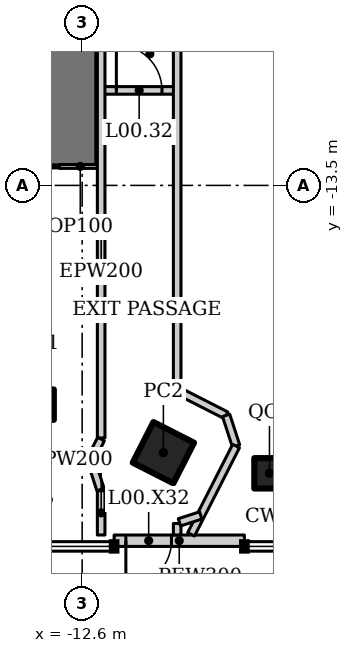
"""IFC4 building model, lengths in metres.
Left out: names, types, materials, properties, quantities, classifications, styles, units other than length and angle.
Written with IfcOpenShell. Run it as: python <this file> out.ifc"""

import sys

from ifc_helpers import new_model, si_unit, direction, frame, frame_2d, origin, origin_2d, place, context, subcontext, project, spatial, rectangle, hollow_rectangle, extrude, element, fill, save


model = new_model("IFC4")
c1 = context("Model", 3, precision=1e-05, world=origin(), true_north=direction((0.0, 1.0)))
c2 = subcontext(c1, "Body", "Model", "MODEL_VIEW")
j1 = project(units=[si_unit("LENGTHUNIT", "METRE"), si_unit("PLANEANGLEUNIT", "RADIAN")], contexts=[c1])
p1 = place(None, origin())
s1 = spatial("IfcSite", under=j1, at=p1, CompositionType="ELEMENT")
p2 = place(p1, origin())
s2 = spatial("IfcBuilding", under=s1, at=p2, CompositionType="ELEMENT")
p3 = place(p2, origin())
s3 = spatial("IfcBuildingStorey", under=s2, at=p3, CompositionType="ELEMENT", Elevation=0.0)
p4 = place(p3, frame((-10.463, -20.534, 0.0), z_axis=(0.0, 0.0, 1.0), x_axis=(0.45399049974, 0.891006524188, 0.0)))
e1 = element("IfcColumn", 1, at=p4, inside=s3, PredefinedType="COLUMN", context=c2, shape_type="SweptSolid", body=[
    extrude(hollow_rectangle(XDim=1.2, YDim=1.2, WallThickness=0.1, at=origin_2d()), origin(), (0.0, 0.0, 1.0), 6.5),
])
for number, where, z_axis, x_axis in (
    (2, (-13.745, -19.27, 0.0), (0.0, 0.0, 1.0), (1.0, 0.0, 0.0)),
    (3, (-7.671, -21.076, 0.0), (0.0, 0.0, 1.0), (1.0, 0.0, 0.0)),
):
    element("IfcColumn", number, at=place(p3, frame(where, z_axis=z_axis, x_axis=x_axis)), inside=s3, PredefinedType="COLUMN", context=c2, shape_type="SweptSolid", body=[
        extrude(hollow_rectangle(XDim=0.8, YDim=0.8, WallThickness=0.05, at=origin_2d()), origin(), (0.0, 0.0, 1.0), 6.5),
    ])
p5 = place(p3, frame((-13.2, 13.0, 0.0), z_axis=(0.0, 0.0, 1.0), x_axis=(0.0, -1.0, 0.0)))
e4 = element("IfcWall", 4, at=p5, inside=s3, PredefinedType="SHEAR", context=c2, shape_type="SweptSolid", body=[
    extrude(rectangle(XDim=26.0, YDim=2.0, at=frame_2d((13.0, 0.0))), origin(), (0.0, 0.0, 1.0), 6.5),
])
p6 = place(p5, frame((12.1, 0.0, 0.0)))
e5 = element("IfcOpeningElement", 5, at=p6, cuts=e4, PredefinedType="OPENING", context=c2, shape_type="SweptSolid", body=[
    extrude(rectangle(XDim=1.8, YDim=2.1, at=frame_2d((0.9, 1.05))), frame((0.0, 1.01, 0.0), z_axis=(0.0, -1.0, 0.0), x_axis=(1.0, 0.0, 0.0)), (0.0, 0.0, 1.0), 2.02),
])
p7 = place(p3, frame((-11.759, -22.85, 0.0), z_axis=(0.0, 0.0, 1.0), x_axis=(1.0, 0.0, 0.0)))
e6 = element("IfcWall", 6, at=p7, inside=s3, PredefinedType="SOLIDWALL", context=c2, shape_type="SweptSolid", body=[
    extrude(rectangle(XDim=3.428, YDim=0.3, at=frame_2d((1.714, 0.0))), origin(), (0.0, 0.0, 1.0), 6.3),
])
p8 = place(p7, frame((0.309, 0.0, 0.0)))
e7 = element("IfcOpeningElement", 7, at=p8, cuts=e6, PredefinedType="OPENING", context=c2, shape_type="SweptSolid", body=[
    extrude(rectangle(XDim=1.2, YDim=2.1, at=frame_2d((0.6, 1.05))), frame((0.0, 0.16, 0.0), z_axis=(0.0, -1.0, 0.0), x_axis=(1.0, 0.0, 0.0)), (0.0, 0.0, 1.0), 0.32),
])
p9 = place(p3, frame((-12.1, -11.0, 0.0), z_axis=(0.0, 0.0, 1.0), x_axis=(1.0, 0.0, 0.0)))
e8 = element("IfcWall", 8, at=p9, inside=s3, PredefinedType="SOLIDWALL", context=c2, shape_type="SweptSolid", body=[
    extrude(rectangle(XDim=2.0, YDim=0.2, at=frame_2d((1.0, 0.0))), origin(), (0.0, 0.0, 1.0), 6.3),
])
p10 = place(p9, frame((0.4, 0.0, 0.0)))
e9 = element("IfcOpeningElement", 9, at=p10, cuts=e8, PredefinedType="OPENING", context=c2, shape_type="SweptSolid", body=[
    extrude(rectangle(XDim=1.2, YDim=2.1, at=frame_2d((0.6, 1.05))), frame((0.0, 0.11, 0.0), z_axis=(0.0, -1.0, 0.0), x_axis=(1.0, 0.0, 0.0)), (0.0, 0.0, 1.0), 0.22),
])
p11 = place(p3, frame((-13.2, -13.0, 0.0), z_axis=(0.0, 0.0, 1.0), x_axis=(1.0, 0.0, 0.0)))
e10 = element("IfcWall", 10, at=p11, inside=s3, PredefinedType="PARTITIONING", context=c2, shape_type="SweptSolid", body=[
    extrude(rectangle(XDim=1.1, YDim=0.1, at=frame_2d((0.55, 0.0))), origin(), (0.0, 0.0, 1.0), 6.3),
])
p12 = place(p3, frame((-12.1, -9.2, 0.0), z_axis=(0.0, 0.0, 1.0), x_axis=(0.0, -1.0, 0.0)))
e11 = element("IfcWall", 11, at=p12, inside=s3, PredefinedType="SOLIDWALL", context=c2, shape_type="SweptSolid", body=[
    extrude(rectangle(XDim=10.946, YDim=0.2, at=frame_2d((5.473, 0.0))), origin(), (0.0, 0.0, 1.0), 6.3),
])
p13 = place(p3, frame((-12.1, -21.535, 0.0), z_axis=(0.0, 0.0, 1.0), x_axis=(0.0, -1.0, 0.0)))
e12 = element("IfcWall", 12, at=p13, inside=s3, PredefinedType="SOLIDWALL", context=c2, shape_type="SweptSolid", body=[
    extrude(rectangle(XDim=1.165, YDim=0.2, at=frame_2d((0.583, 0.0))), origin(), (0.0, 0.0, 1.0), 6.3),
])
p14 = place(p3, frame((-10.1, -22.7, 0.0), z_axis=(0.0, 0.0, 1.0), x_axis=(0.0, 1.0, 0.0)))
e13 = element("IfcWall", 13, at=p14, inside=s3, PredefinedType="SOLIDWALL", context=c2, shape_type="SweptSolid", body=[
    extrude(rectangle(XDim=0.303, YDim=0.2, at=frame_2d((0.152, 0.0))), origin(), (0.0, 0.0, 1.0), 6.3),
])
p15 = place(p3, frame((-10.1, -18.884, 0.0), z_axis=(0.0, 0.0, 1.0), x_axis=(0.0, 1.0, 0.0)))
e14 = element("IfcWall", 14, at=p15, inside=s3, PredefinedType="SOLIDWALL", context=c2, shape_type="SweptSolid", body=[
    extrude(rectangle(XDim=9.684, YDim=0.2, at=frame_2d((4.842, 0.0))), origin(), (0.0, 0.0, 1.0), 6.3),
])
p16 = place(p3, frame((-12.117, -21.505, 0.0), z_axis=(0.0, 0.0, 1.0), x_axis=(-0.308775894508, 0.951134820607, 0.0)))
e15 = element("IfcWall", 15, at=p16, inside=s3, PredefinedType="SOLIDWALL", context=c2, shape_type="SweptSolid", body=[
    extrude(rectangle(XDim=0.836, YDim=0.2, at=frame_2d((0.418, 0.0))), origin(), (0.0, 0.0, 1.0), 6.3),
])
p17 = place(p3, frame((-12.375, -20.709, 0.0), z_axis=(0.0, 0.0, 1.0), x_axis=(0.454060346632, 0.89097093197, 0.0)))
e16 = element("IfcWall", 16, at=p17, inside=s3, PredefinedType="SOLIDWALL", context=c2, shape_type="SweptSolid", body=[
    extrude(rectangle(XDim=0.598, YDim=0.2, at=frame_2d((0.299, 0.0))), origin(), (0.0, 0.0, 1.0), 6.3),
])
p18 = place(p3, frame((-10.063, -18.914, 0.0), z_axis=(0.0, 0.0, 1.0), x_axis=(0.890958554587, -0.454084633089, 0.0)))
e17 = element("IfcWall", 17, at=p18, inside=s3, PredefinedType="SOLIDWALL", context=c2, shape_type="SweptSolid", body=[
    extrude(rectangle(XDim=1.404, YDim=0.2, at=frame_2d((0.702, 0.0))), origin(), (0.0, 0.0, 1.0), 6.3),
])
p19 = place(p3, frame((-8.812, -19.551, 0.0), z_axis=(0.0, 0.0, 1.0), x_axis=(0.309144594925, -0.951015046899, 0.0)))
e18 = element("IfcWall", 18, at=p19, inside=s3, PredefinedType="SOLIDWALL", context=c2, shape_type="SweptSolid", body=[
    extrude(rectangle(XDim=0.849, YDim=0.2, at=frame_2d((0.424, 0.0))), origin(), (0.0, 0.0, 1.0), 6.3),
])
p20 = place(p3, frame((-8.55, -20.359, 0.0), z_axis=(0.0, 0.0, 1.0), x_axis=(-0.453979075462, -0.891012345056, 0.0)))
e19 = element("IfcWall", 19, at=p20, inside=s3, PredefinedType="SOLIDWALL", context=c2, shape_type="SweptSolid", body=[
    extrude(rectangle(XDim=2.608, YDim=0.2, at=frame_2d((1.304, 0.0))), origin(), (0.0, 0.0, 1.0), 6.3),
])
p21 = place(p3, frame((-9.48, -22.185, 0.0), z_axis=(0.0, 0.0, 1.0), x_axis=(-0.951018841362, -0.309132921855, 0.0)))
e20 = element("IfcWall", 20, at=p21, inside=s3, PredefinedType="SOLIDWALL", context=c2, shape_type="SweptSolid", body=[
    extrude(rectangle(XDim=0.589, YDim=0.2, at=frame_2d((0.294, 0.0))), origin(), (0.0, 0.0, 1.0), 6.3),
])
p22 = place(p8, frame((1.2, 0.0, 0.0), z_axis=(0.0, 0.0, 1.0), x_axis=(-1.0, 0.0, 0.0)))
e21 = element("IfcDoor", 21, at=p22, inside=s3, OperationType="SINGLE_SWING_RIGHT", PredefinedType="DOOR", context=c2, shape_type="SweptSolid", body=[
    extrude(rectangle(XDim=1.2, YDim=2.1, at=frame_2d((0.6, 1.05))), frame((0.0, 0.025, 0.0), z_axis=(0.0, -1.0, 0.0), x_axis=(1.0, 0.0, 0.0)), (0.0, 0.0, 1.0), 0.05),
])
fill(e7, e21)
p23 = place(p10, origin())
e22 = element("IfcDoor", 22, at=p23, inside=s3, OperationType="SINGLE_SWING_RIGHT", PredefinedType="DOOR", context=c2, shape_type="SweptSolid", body=[
    extrude(rectangle(XDim=1.2, YDim=2.1, at=frame_2d((0.6, 1.05))), frame((0.0, 0.025, 0.0), z_axis=(0.0, -1.0, 0.0), x_axis=(1.0, 0.0, 0.0)), (0.0, 0.0, 1.0), 0.05),
])
fill(e9, e22)
save(model, sys.argv[1])
